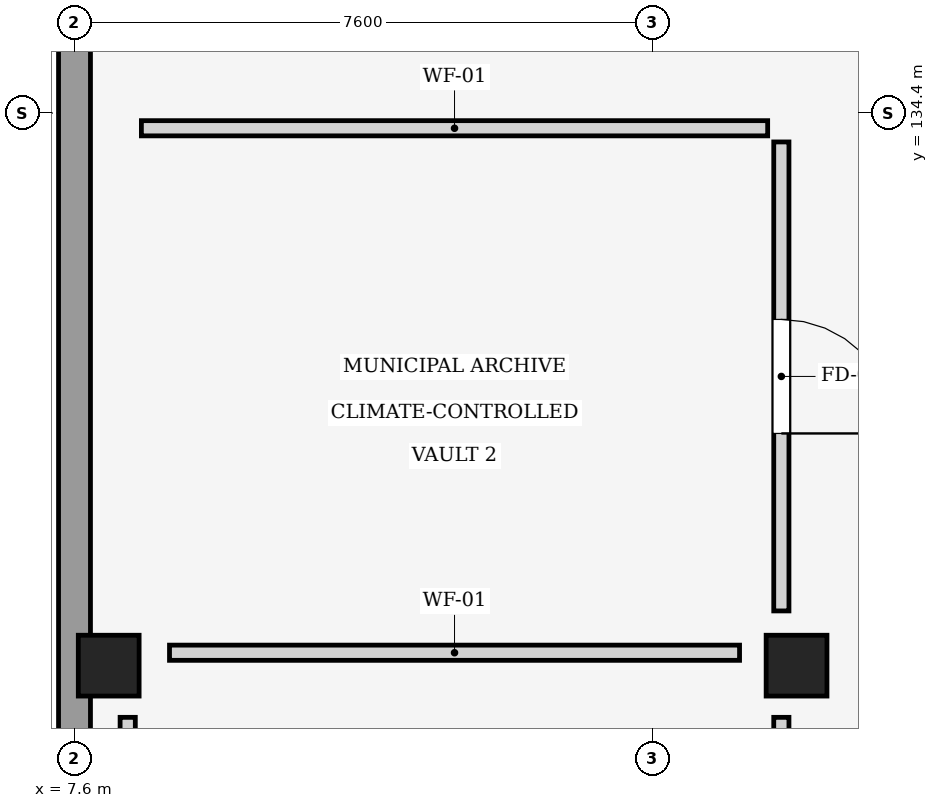
"""IFC4 building model, lengths in metres.
Left out: names, types, materials, properties, quantities, classifications, styles, units other than length and angle.
Written with IfcOpenShell. Run it as: python <this file> out.ifc"""

import sys

from ifc_helpers import new_model, si_unit, direction, frame, frame_2d, origin, origin_2d, place, context, subcontext, project, spatial, rectangle, extrude, element, fill, save


model = new_model("IFC4")
c1 = context("Model", 3, precision=1e-05, world=origin(), true_north=direction((0.0, 1.0)))
c2 = subcontext(c1, "Body", "Model", "MODEL_VIEW")
j1 = project(units=[si_unit("LENGTHUNIT", "METRE"), si_unit("PLANEANGLEUNIT", "RADIAN")], contexts=[c1])
p1 = place(None, origin())
s1 = spatial("IfcSite", under=j1, at=p1, CompositionType="ELEMENT")
p2 = place(p1, origin())
s2 = spatial("IfcBuilding", under=s1, at=p2, CompositionType="ELEMENT")
p3 = place(p2, frame((0.0, 0.0, -4.2)))
s3 = spatial("IfcBuildingStorey", under=s2, at=p3, CompositionType="ELEMENT", Elevation=-4.2)
for number, where, z_axis, x_axis in (
    (1, (8.05, 127.13, 0.0), (0.0, 0.0, 1.0), (1.0, 0.0, 0.0)),
    (2, (17.1, 127.13, 0.0), (0.0, 0.0, 1.0), (1.0, 0.0, 0.0)),
):
    element("IfcColumn", number, at=place(p3, frame(where, z_axis=z_axis, x_axis=x_axis)), inside=s3, PredefinedType="COLUMN", context=c2, shape_type="SweptSolid", body=[
        extrude(rectangle(XDim=0.8, YDim=0.8, at=origin_2d()), origin(), (0.0, 0.0, 1.0), 4.2),
    ])
p4 = place(p3, frame((7.6, 101.02, 0.0), z_axis=(0.0, 0.0, 1.0), x_axis=(0.0, 1.0, 0.0)))
e3 = element("IfcWall", 3, at=p4, inside=s3, PredefinedType="USERDEFINED", context=c2, shape_type="SweptSolid", body=[
    extrude(rectangle(XDim=46.76, YDim=0.42, at=frame_2d((23.38, 0.0))), origin(), (0.0, 0.0, 1.0), 3.75),
])
p5 = place(p3, frame((16.9, 126.45, 0.0), z_axis=(0.0, 0.0, 1.0), x_axis=(0.0, -1.0, 0.0)))
e4 = element("IfcWall", 4, at=p5, inside=s3, PredefinedType="PARTITIONING", context=c2, shape_type="SweptSolid", body=[
    extrude(rectangle(XDim=24.4, YDim=0.2, at=frame_2d((12.2, 0.0))), origin(), (0.0, 0.0, 1.0), 3.105),
])
p6 = place(p5, frame((11.45, 0.0, 0.0)))
e5 = element("IfcOpeningElement", 5, at=p6, cuts=e4, PredefinedType="OPENING", context=c2, shape_type="SweptSolid", body=[
    extrude(rectangle(XDim=1.5, YDim=2.25, at=frame_2d((0.75, 1.125))), frame((0.0, 0.11, 0.0), z_axis=(0.0, -1.0, 0.0), x_axis=(1.0, 0.0, 0.0)), (0.0, 0.0, 1.0), 0.22),
])
p7 = place(p3, frame((8.3, 102.05, 0.0), z_axis=(0.0, 0.0, 1.0), x_axis=(0.0, 1.0, 0.0)))
e6 = element("IfcWall", 6, at=p7, inside=s3, PredefinedType="PARTITIONING", context=c2, shape_type="SweptSolid", body=[
    extrude(rectangle(XDim=24.4, YDim=0.2, at=frame_2d((12.2, 0.0))), origin(), (0.0, 0.0, 1.0), 3.105),
])
p8 = place(p3, frame((16.9, 134.02, 0.0), z_axis=(0.0, 0.0, 1.0), x_axis=(0.0, -1.0, 0.0)))
e7 = element("IfcWall", 7, at=p8, inside=s3, PredefinedType="PARTITIONING", context=c2, shape_type="SweptSolid", body=[
    extrude(rectangle(XDim=6.17, YDim=0.2, at=frame_2d((3.085, 0.0))), origin(), (0.0, 0.0, 1.0), 3.255),
])
p9 = place(p8, frame((2.335, 0.0, 0.0)))
e8 = element("IfcOpeningElement", 8, at=p9, cuts=e7, PredefinedType="OPENING", context=c2, shape_type="SweptSolid", body=[
    extrude(rectangle(XDim=1.5, YDim=2.25, at=frame_2d((0.75, 1.125))), frame((0.0, 0.11, 0.0), z_axis=(0.0, -1.0, 0.0), x_axis=(1.0, 0.0, 0.0)), (0.0, 0.0, 1.0), 0.22),
])
p10 = place(p3, frame((16.35, 127.3, 0.0), z_axis=(0.0, 0.0, 1.0), x_axis=(-1.0, 0.0, 0.0)))
e9 = element("IfcWall", 9, at=p10, inside=s3, PredefinedType="PARTITIONING", context=c2, shape_type="SweptSolid", body=[
    extrude(rectangle(XDim=7.5, YDim=0.2, at=frame_2d((3.75, 0.0))), origin(), (0.0, 0.0, 1.0), 3.105),
])
p11 = place(p3, frame((8.48, 134.2, 0.0), z_axis=(0.0, 0.0, 1.0), x_axis=(1.0, 0.0, 0.0)))
e10 = element("IfcWall", 10, at=p11, inside=s3, PredefinedType="PARTITIONING", context=c2, shape_type="SweptSolid", body=[
    extrude(rectangle(XDim=8.24, YDim=0.2, at=frame_2d((4.12, 0.0))), origin(), (0.0, 0.0, 1.0), 3.255),
])
p12 = place(p9, origin())
e11 = element("IfcDoor", 11, at=p12, inside=s3, OperationType="SINGLE_SWING_RIGHT", PredefinedType="DOOR", context=c2, shape_type="SweptSolid", body=[
    extrude(rectangle(XDim=1.5, YDim=2.25, at=frame_2d((0.75, 1.125))), frame((0.0, 0.025, 0.0), z_axis=(0.0, -1.0, 0.0), x_axis=(1.0, 0.0, 0.0)), (0.0, 0.0, 1.0), 0.05),
])
fill(e8, e11)
save(model, sys.argv[1])
